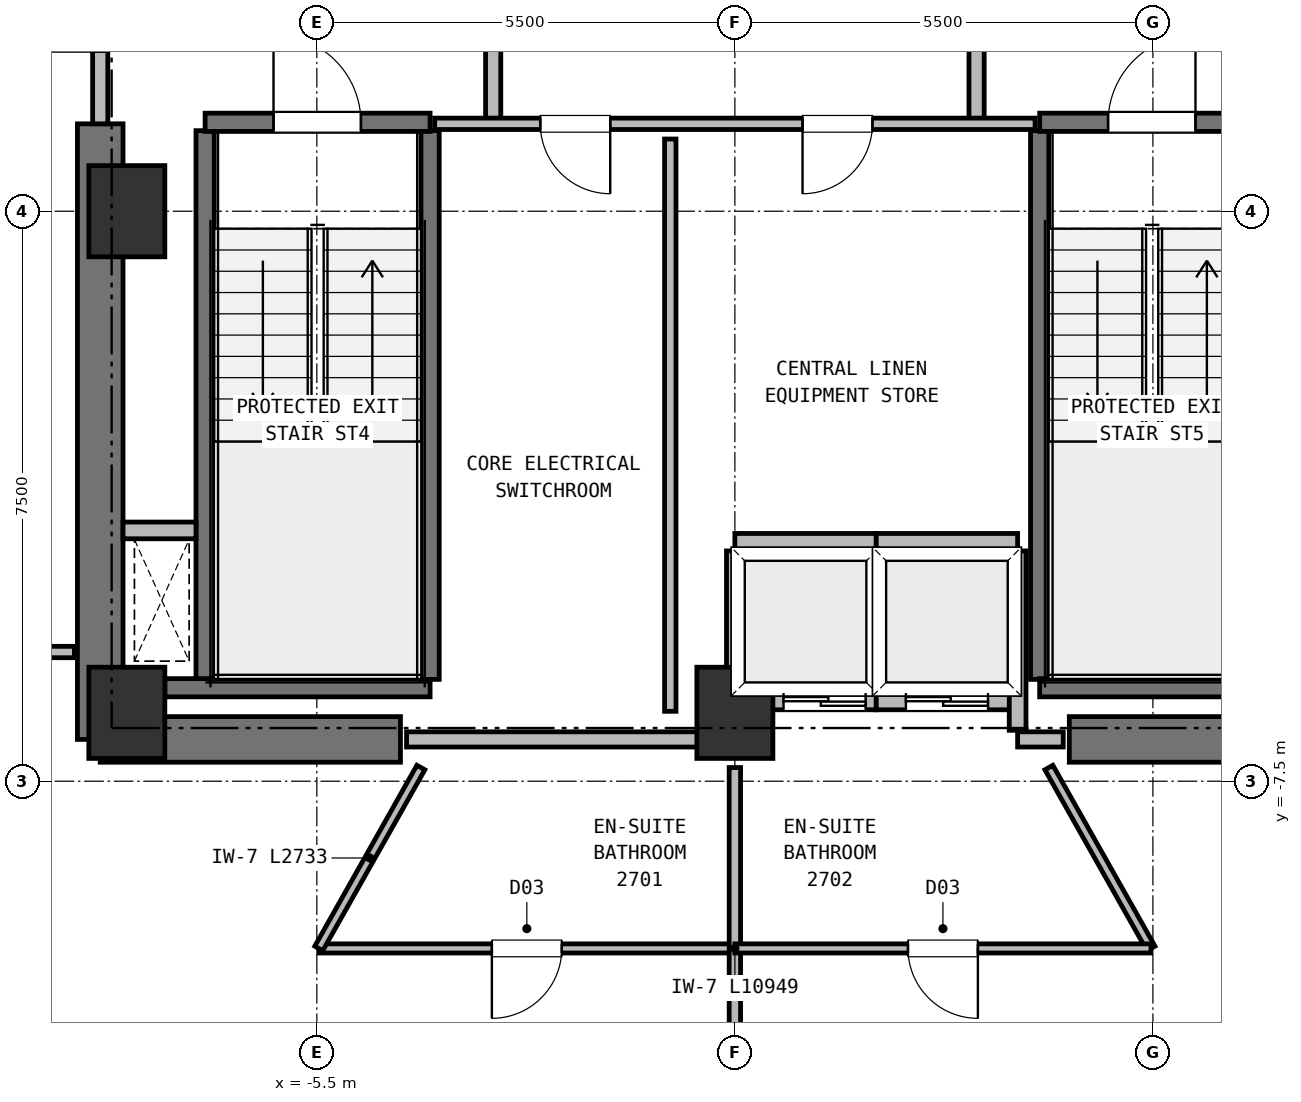
"""IFC4 building model, lengths in metres.
Left out: names, types, materials, properties, quantities, classifications, styles, units other than length and angle.
Written with IfcOpenShell. Run it as: python <this file> out.ifc"""

import sys

from ifc_helpers import new_model, si_unit, direction, frame, frame_2d, origin, origin_2d, place, context, subcontext, project, spatial, rectangle, extrude, element, fill, save


model = new_model("IFC4")
c1 = context("Model", 3, precision=1e-05, world=origin(), true_north=direction((0.0, 1.0)))
c2 = subcontext(c1, "Body", "Model", "MODEL_VIEW")
j1 = project(units=[si_unit("LENGTHUNIT", "METRE"), si_unit("PLANEANGLEUNIT", "RADIAN")], contexts=[c1])
p1 = place(None, origin())
s1 = spatial("IfcSite", under=j1, at=p1, CompositionType="ELEMENT")
p2 = place(p1, origin())
s2 = spatial("IfcBuilding", under=s1, at=p2, CompositionType="ELEMENT")
p3 = place(p2, frame((0.0, 0.0, 101.0)))
s3 = spatial("IfcBuildingStorey", under=s2, at=p3, CompositionType="ELEMENT", Elevation=101.0)
for number, where, z_axis, x_axis in (
    (1, (-8.0, -6.6, 0.0), (0.0, 0.0, 1.0), (1.0, 0.0, 0.0)),
    (2, (0.0, -6.6, 0.0), (0.0, 0.0, 1.0), (1.0, 0.0, 0.0)),
    (3, (-8.0, 0.0, 0.0), (0.0, 0.0, 1.0), (1.0, 0.0, 0.0)),
):
    element("IfcColumn", number, at=place(p3, frame(where, z_axis=z_axis, x_axis=x_axis)), inside=s3, PredefinedType="COLUMN", context=c2, shape_type="SweptSolid", body=[
        extrude(rectangle(XDim=1.0, YDim=1.2, at=origin_2d()), origin(), (0.0, 0.0, 1.0), 3.75),
    ])
for number, where, z_axis, x_axis in (
    (4, (-8.35, -6.95, 0.0), (0.0, 0.0, 1.0), (1.0, 0.0, 0.0)),
    (5, (4.4, -6.95, 0.0), (0.0, 0.0, 1.0), (1.0, 0.0, 0.0)),
):
    element("IfcWall", number, at=place(p3, frame(where, z_axis=z_axis, x_axis=x_axis)), inside=s3, PredefinedType="SHEAR", context=c2, shape_type="SweptSolid", body=[
        extrude(rectangle(XDim=3.95, YDim=0.6, at=frame_2d((1.975, 0.0))), origin(), (0.0, 0.0, 1.0), 3.5),
    ])
p4 = place(p3, frame((-8.35, -6.95, 0.0), z_axis=(0.0, 0.0, 1.0), x_axis=(0.0, 1.0, 0.0)))
e6 = element("IfcWall", 6, at=p4, inside=s3, PredefinedType="SHEAR", context=c2, shape_type="SweptSolid", body=[
    extrude(rectangle(XDim=8.1, YDim=0.6, at=frame_2d((4.05, 0.0))), origin(), (0.0, 0.0, 1.0), 3.5),
])
p5 = place(p3, frame((-6.97, -6.16, 0.0), z_axis=(0.0, 0.0, 1.0), x_axis=(0.0, 1.0, 0.0)))
e7 = element("IfcWall", 7, at=p5, inside=s3, PredefinedType="SHEAR", context=c2, shape_type="SweptSolid", body=[
    extrude(rectangle(XDim=7.22, YDim=0.24, at=frame_2d((3.61, 0.0))), origin(), (0.0, 0.0, 1.0), 3.5),
])
p6 = place(p3, frame((-7.5, -6.27, 0.0), z_axis=(0.0, 0.0, 1.0), x_axis=(1.0, 0.0, 0.0)))
e8 = element("IfcWall", 8, at=p6, inside=s3, PredefinedType="SHEAR", context=c2, shape_type="SweptSolid", body=[
    extrude(rectangle(XDim=3.49, YDim=0.24, at=frame_2d((1.745, 0.0))), origin(), (0.0, 0.0, 1.0), 3.5),
])
p7 = place(p3, frame((-4.01, -6.16, 0.0), z_axis=(0.0, 0.0, 1.0), x_axis=(0.0, 1.0, 0.0)))
e9 = element("IfcWall", 9, at=p7, inside=s3, PredefinedType="SHEAR", context=c2, shape_type="SweptSolid", body=[
    extrude(rectangle(XDim=7.22, YDim=0.24, at=frame_2d((3.61, 0.0))), origin(), (0.0, 0.0, 1.0), 3.5),
])
p8 = place(p3, frame((-6.97, 1.17, 0.0), z_axis=(0.0, 0.0, 1.0), x_axis=(1.0, 0.0, 0.0)))
e10 = element("IfcWall", 10, at=p8, inside=s3, PredefinedType="SHEAR", context=c2, shape_type="SweptSolid", body=[
    extrude(rectangle(XDim=2.96, YDim=0.24, at=frame_2d((1.48, 0.0))), origin(), (0.0, 0.0, 1.0), 3.5),
])
p9 = place(p8, frame((0.9, 0.0, 0.0)))
e11 = element("IfcOpeningElement", 11, at=p9, cuts=e10, PredefinedType="OPENING", context=c2, shape_type="SweptSolid", body=[
    extrude(rectangle(XDim=1.15, YDim=2.15, at=frame_2d((0.575, 1.075))), frame((0.0, 0.13, 0.0), z_axis=(0.0, -1.0, 0.0), x_axis=(1.0, 0.0, 0.0)), (0.0, 0.0, 1.0), 0.26),
])
p10 = place(p3, frame((4.01, -6.16, 0.0), z_axis=(0.0, 0.0, 1.0), x_axis=(0.0, 1.0, 0.0)))
e12 = element("IfcWall", 12, at=p10, inside=s3, PredefinedType="SHEAR", context=c2, shape_type="SweptSolid", body=[
    extrude(rectangle(XDim=7.22, YDim=0.24, at=frame_2d((3.61, 0.0))), origin(), (0.0, 0.0, 1.0), 3.5),
])
p11 = place(p3, frame((4.01, -6.27, 0.0), z_axis=(0.0, 0.0, 1.0), x_axis=(1.0, 0.0, 0.0)))
e13 = element("IfcWall", 13, at=p11, inside=s3, PredefinedType="SHEAR", context=c2, shape_type="SweptSolid", body=[
    extrude(rectangle(XDim=3.49, YDim=0.24, at=frame_2d((1.745, 0.0))), origin(), (0.0, 0.0, 1.0), 3.5),
])
p12 = place(p3, frame((4.01, 1.17, 0.0), z_axis=(0.0, 0.0, 1.0), x_axis=(1.0, 0.0, 0.0)))
e14 = element("IfcWall", 14, at=p12, inside=s3, PredefinedType="SHEAR", context=c2, shape_type="SweptSolid", body=[
    extrude(rectangle(XDim=2.96, YDim=0.24, at=frame_2d((1.48, 0.0))), origin(), (0.0, 0.0, 1.0), 3.5),
])
p13 = place(p12, frame((0.9, 0.0, 0.0)))
e15 = element("IfcOpeningElement", 15, at=p13, cuts=e14, PredefinedType="OPENING", context=c2, shape_type="SweptSolid", body=[
    extrude(rectangle(XDim=1.15, YDim=2.15, at=frame_2d((0.575, 1.075))), frame((0.0, 0.13, 0.0), z_axis=(0.0, -1.0, 0.0), x_axis=(1.0, 0.0, 0.0)), (0.0, 0.0, 1.0), 0.26),
])
p14 = place(p3, frame((-8.05, -4.2, 0.0), z_axis=(0.0, 0.0, 1.0), x_axis=(1.0, 0.0, 0.0)))
e16 = element("IfcWall", 16, at=p14, inside=s3, PredefinedType="PARTITIONING", context=c2, shape_type="SweptSolid", body=[
    extrude(rectangle(XDim=0.96, YDim=0.22, at=frame_2d((0.48, 0.0))), origin(), (0.0, 0.0, 1.0), 3.5),
])
p15 = place(p3, frame((0.0, -6.45, 0.0), z_axis=(0.0, 0.0, 1.0), x_axis=(1.0, 0.0, 0.0)))
e17 = element("IfcWall", 17, at=p15, inside=s3, PredefinedType="PARTITIONING", context=c2, shape_type="SweptSolid", body=[
    extrude(rectangle(XDim=1.86, YDim=0.22, at=frame_2d((0.93, 0.0))), origin(), (0.0, 0.0, 1.0), 3.12),
])
p16 = place(p15, frame((0.64, 0.0, 0.0)))
e18 = element("IfcOpeningElement", 18, at=p16, cuts=e17, PredefinedType="OPENING", context=c2, shape_type="SweptSolid", body=[
    extrude(rectangle(XDim=1.08, YDim=2.15, at=frame_2d((0.54, 1.075))), frame((0.0, 0.12, 0.0), z_axis=(0.0, -1.0, 0.0), x_axis=(1.0, 0.0, 0.0)), (0.0, 0.0, 1.0), 0.24),
])
for number, where, z_axis, x_axis in (
    (19, (0.0, -4.35, 0.0), (0.0, 0.0, 1.0), (1.0, 0.0, 0.0)),
    (20, (0.0, -6.33, 0.0), (0.0, 0.0, 1.0), (0.0, 1.0, 0.0)),
    (21, (1.86, -6.33, 0.0), (0.0, 0.0, 1.0), (0.0, 1.0, 0.0)),
):
    element("IfcWall", number, at=place(p3, frame(where, z_axis=z_axis, x_axis=x_axis)), inside=s3, PredefinedType="PARTITIONING", context=c2, shape_type="SweptSolid", body=[
        extrude(rectangle(XDim=1.86, YDim=0.22, at=frame_2d((0.93, 0.0))), origin(), (0.0, 0.0, 1.0), 3.5),
    ])
p17 = place(p3, frame((1.86, -6.45, 0.0), z_axis=(0.0, 0.0, 1.0), x_axis=(1.0, 0.0, 0.0)))
e22 = element("IfcWall", 22, at=p17, inside=s3, PredefinedType="PARTITIONING", context=c2, shape_type="SweptSolid", body=[
    extrude(rectangle(XDim=1.86, YDim=0.22, at=frame_2d((0.93, 0.0))), origin(), (0.0, 0.0, 1.0), 3.12),
])
p18 = place(p17, frame((0.39, 0.0, 0.0)))
e23 = element("IfcOpeningElement", 23, at=p18, cuts=e22, PredefinedType="OPENING", context=c2, shape_type="SweptSolid", body=[
    extrude(rectangle(XDim=1.08, YDim=2.15, at=frame_2d((0.54, 1.075))), frame((0.0, 0.12, 0.0), z_axis=(0.0, -1.0, 0.0), x_axis=(1.0, 0.0, 0.0)), (0.0, 0.0, 1.0), 0.24),
])
p19 = place(p3, frame((1.86, -4.35, 0.0), z_axis=(0.0, 0.0, 1.0), x_axis=(1.0, 0.0, 0.0)))
e24 = element("IfcWall", 24, at=p19, inside=s3, PredefinedType="PARTITIONING", context=c2, shape_type="SweptSolid", body=[
    extrude(rectangle(XDim=1.86, YDim=0.22, at=frame_2d((0.93, 0.0))), origin(), (0.0, 0.0, 1.0), 3.5),
])
p20 = place(p3, frame((3.72, -6.83, 0.0), z_axis=(0.0, 0.0, 1.0), x_axis=(0.0, 1.0, 0.0)))
e25 = element("IfcWall", 25, at=p20, inside=s3, PredefinedType="PARTITIONING", context=c2, shape_type="SweptSolid", body=[
    extrude(rectangle(XDim=2.36, YDim=0.22, at=frame_2d((1.18, 0.0))), origin(), (0.0, 0.0, 1.0), 3.5),
])
p21 = place(p3, frame((-3.18, 1.15, 0.0), z_axis=(0.0, 0.0, 1.0), x_axis=(0.0, 1.0, 0.0)))
e26 = element("IfcWall", 26, at=p21, inside=s3, PredefinedType="PARTITIONING", context=c2, shape_type="SweptSolid", body=[
    extrude(rectangle(XDim=3.3, YDim=0.2, at=frame_2d((1.65, 0.0))), origin(), (0.0, 0.0, 1.0), 3.5),
])
p22 = place(p21, frame((1.08, 0.0, 0.0)))
e27 = element("IfcOpeningElement", 27, at=p22, cuts=e26, PredefinedType="OPENING", context=c2, shape_type="SweptSolid", body=[
    extrude(rectangle(XDim=1.15, YDim=2.15, at=frame_2d((0.575, 1.075))), frame((0.0, 0.11, 0.0), z_axis=(0.0, -1.0, 0.0), x_axis=(1.0, 0.0, 0.0)), (0.0, 0.0, 1.0), 0.22),
])
p23 = place(p3, frame((3.18, 1.15, 0.0), z_axis=(0.0, 0.0, 1.0), x_axis=(0.0, 1.0, 0.0)))
e28 = element("IfcWall", 28, at=p23, inside=s3, PredefinedType="PARTITIONING", context=c2, shape_type="SweptSolid", body=[
    extrude(rectangle(XDim=3.3, YDim=0.2, at=frame_2d((1.65, 0.0))), origin(), (0.0, 0.0, 1.0), 3.5),
])
p24 = place(p23, frame((1.08, 0.0, 0.0)))
e29 = element("IfcOpeningElement", 29, at=p24, cuts=e28, PredefinedType="OPENING", context=c2, shape_type="SweptSolid", body=[
    extrude(rectangle(XDim=1.15, YDim=2.15, at=frame_2d((0.575, 1.075))), frame((0.0, 0.11, 0.0), z_axis=(0.0, -1.0, 0.0), x_axis=(1.0, 0.0, 0.0)), (0.0, 0.0, 1.0), 0.22),
])
p25 = place(p3, frame((-8.35, 1.15, 0.0), z_axis=(0.0, 0.0, 1.0), x_axis=(0.0, 1.0, 0.0)))
e30 = element("IfcWall", 30, at=p25, inside=s3, PredefinedType="PARTITIONING", context=c2, shape_type="SweptSolid", body=[
    extrude(rectangle(XDim=5.4, YDim=0.2, at=frame_2d((2.7, 0.0))), origin(), (0.0, 0.0, 1.0), 3.5),
])
p26 = place(p25, frame((0.95, 0.0, 0.0)))
e31 = element("IfcOpeningElement", 31, at=p26, cuts=e30, PredefinedType="OPENING", context=c2, shape_type="SweptSolid", body=[
    extrude(rectangle(XDim=1.15, YDim=2.15, at=frame_2d((0.575, 1.075))), frame((0.0, 0.11, 0.0), z_axis=(0.0, -1.0, 0.0), x_axis=(1.0, 0.0, 0.0)), (0.0, 0.0, 1.0), 0.22),
])
p27 = place(p3, frame((3.95, 1.15, 0.0), z_axis=(0.0, 0.0, 1.0), x_axis=(-1.0, 0.0, 0.0)))
e32 = element("IfcWall", 32, at=p27, inside=s3, PredefinedType="PARTITIONING", context=c2, shape_type="SweptSolid", body=[
    extrude(rectangle(XDim=7.9, YDim=0.15, at=frame_2d((3.95, 0.0))), origin(), (0.0, 0.0, 1.0), 3.5),
])
p28 = place(p27, frame((5.59, 0.0, 0.0)))
e33 = element("IfcOpeningElement", 33, at=p28, cuts=e32, PredefinedType="OPENING", context=c2, shape_type="SweptSolid", body=[
    extrude(rectangle(XDim=0.92, YDim=2.05, at=frame_2d((0.46, 1.025))), frame((0.0, 0.085, 0.0), z_axis=(0.0, -1.0, 0.0), x_axis=(1.0, 0.0, 0.0)), (0.0, 0.0, 1.0), 0.17),
])
p29 = place(p27, frame((2.14, 0.0, 0.0)))
e34 = element("IfcOpeningElement", 34, at=p29, cuts=e32, PredefinedType="OPENING", context=c2, shape_type="SweptSolid", body=[
    extrude(rectangle(XDim=0.92, YDim=2.05, at=frame_2d((0.46, 1.025))), frame((0.0, 0.085, 0.0), z_axis=(0.0, -1.0, 0.0), x_axis=(1.0, 0.0, 0.0)), (0.0, 0.0, 1.0), 0.17),
])
p30 = place(p3, frame((-4.32, -6.95, 0.0), z_axis=(0.0, 0.0, 1.0), x_axis=(1.0, 0.0, 0.0)))
e35 = element("IfcWall", 35, at=p30, inside=s3, PredefinedType="PARTITIONING", context=c2, shape_type="SweptSolid", body=[
    extrude(rectangle(XDim=4.32, YDim=0.2, at=frame_2d((2.16, 0.0))), origin(), (0.0, 0.0, 1.0), 3.5),
])
p31 = place(p3, frame((3.72, -6.95, 0.0), z_axis=(0.0, 0.0, 1.0), x_axis=(1.0, 0.0, 0.0)))
e36 = element("IfcWall", 36, at=p31, inside=s3, PredefinedType="PARTITIONING", context=c2, shape_type="SweptSolid", body=[
    extrude(rectangle(XDim=0.6, YDim=0.2, at=frame_2d((0.3, 0.0))), origin(), (0.0, 0.0, 1.0), 3.5),
])
p32 = place(p3, frame((-0.85, -6.58, 0.0), z_axis=(0.0, 0.0, 1.0), x_axis=(0.0, 1.0, 0.0)))
e37 = element("IfcWall", 37, at=p32, inside=s3, PredefinedType="PARTITIONING", context=c2, shape_type="SweptSolid", body=[
    extrude(rectangle(XDim=7.53, YDim=0.15, at=frame_2d((3.765, 0.0))), origin(), (0.0, 0.0, 1.0), 3.5),
])
p33 = place(p3, frame((-8.69, -5.8, 0.0), z_axis=(0.0, 0.0, 1.0), x_axis=(-1.0, 0.0, 0.0)))
e38 = element("IfcWall", 38, at=p33, inside=s3, PredefinedType="PARTITIONING", context=c2, shape_type="SweptSolid", body=[
    extrude(rectangle(XDim=2.02, YDim=0.15, at=frame_2d((1.01, 0.0))), origin(), (0.0, 0.0, 1.0), 3.5),
])
p34 = place(p33, frame((0.52, 0.0, 0.0)))
e39 = element("IfcOpeningElement", 39, at=p34, cuts=e38, PredefinedType="OPENING", context=c2, shape_type="SweptSolid", body=[
    extrude(rectangle(XDim=1.06, YDim=2.15, at=frame_2d((0.53, 1.075))), frame((0.0, 0.085, 0.0), z_axis=(0.0, -1.0, 0.0), x_axis=(1.0, 0.0, 0.0)), (0.0, 0.0, 1.0), 0.17),
])
p35 = place(p3, frame((0.0, -9.7, 0.0), z_axis=(0.0, 0.0, 1.0), x_axis=(-1.0, 0.0, 0.0)))
e40 = element("IfcWall", 40, at=p35, inside=s3, PredefinedType="PARTITIONING", context=c2, shape_type="SweptSolid", body=[
    extrude(rectangle(XDim=5.475, YDim=0.12, at=frame_2d((2.737, 0.0))), origin(), (0.0, 0.0, 1.0), 3.5),
])
p36 = place(p35, frame((2.277, 0.0, 0.0)))
e41 = element("IfcOpeningElement", 41, at=p36, cuts=e40, PredefinedType="OPENING", context=c2, shape_type="SweptSolid", body=[
    extrude(rectangle(XDim=0.92, YDim=2.1, at=frame_2d((0.46, 1.05))), frame((0.0, 0.07, 0.0), z_axis=(0.0, -1.0, 0.0), x_axis=(1.0, 0.0, 0.0)), (0.0, 0.0, 1.0), 0.14),
])
p37 = place(p3, frame((-5.475, -9.7, 0.0), z_axis=(0.0, 0.0, 1.0), x_axis=(0.491533175525, 0.870858850422, 0.0)))
e42 = element("IfcWall", 42, at=p37, inside=s3, PredefinedType="PARTITIONING", context=c2, shape_type="SweptSolid", body=[
    extrude(rectangle(XDim=2.733, YDim=0.12, at=frame_2d((1.366, 0.0))), origin(), (0.0, 0.0, 1.0), 3.5),
])
p38 = place(p3, frame((0.0, -7.32, 0.0), z_axis=(0.0, 0.0, 1.0), x_axis=(0.0, -1.0, 0.0)))
e43 = element("IfcWall", 43, at=p38, inside=s3, PredefinedType="PARTITIONING", context=c2, shape_type="SweptSolid", body=[
    extrude(rectangle(XDim=10.627, YDim=0.15, at=frame_2d((5.314, 0.0))), origin(), (0.0, 0.0, 1.0), 3.5),
])
p39 = place(p3, frame((4.131, -7.32, 0.0), z_axis=(0.0, 0.0, 1.0), x_axis=(0.491533175525, -0.870858850422, 0.0)))
e44 = element("IfcWall", 44, at=p39, inside=s3, PredefinedType="PARTITIONING", context=c2, shape_type="SweptSolid", body=[
    extrude(rectangle(XDim=2.733, YDim=0.12, at=frame_2d((1.366, 0.0))), origin(), (0.0, 0.0, 1.0), 3.5),
])
p40 = place(p3, frame((5.475, -9.7, 0.0), z_axis=(0.0, 0.0, 1.0), x_axis=(-1.0, 0.0, 0.0)))
e45 = element("IfcWall", 45, at=p40, inside=s3, PredefinedType="PARTITIONING", context=c2, shape_type="SweptSolid", body=[
    extrude(rectangle(XDim=5.475, YDim=0.12, at=frame_2d((2.737, 0.0))), origin(), (0.0, 0.0, 1.0), 3.5),
])
p41 = place(p40, frame((2.277, 0.0, 0.0)))
e46 = element("IfcOpeningElement", 46, at=p41, cuts=e45, PredefinedType="OPENING", context=c2, shape_type="SweptSolid", body=[
    extrude(rectangle(XDim=0.92, YDim=2.1, at=frame_2d((0.46, 1.05))), frame((0.0, 0.07, 0.0), z_axis=(0.0, -1.0, 0.0), x_axis=(1.0, 0.0, 0.0)), (0.0, 0.0, 1.0), 0.14),
])
p42 = place(p9, origin())
e47 = element("IfcDoor", 47, at=p42, inside=s3, OperationType="SINGLE_SWING_LEFT", PredefinedType="DOOR", context=c2, shape_type="SweptSolid", body=[
    extrude(rectangle(XDim=1.15, YDim=2.15, at=frame_2d((0.575, 1.075))), frame((0.0, 0.025, 0.0), z_axis=(0.0, -1.0, 0.0), x_axis=(1.0, 0.0, 0.0)), (0.0, 0.0, 1.0), 0.05),
])
fill(e11, e47)
p43 = place(p13, origin())
e48 = element("IfcDoor", 48, at=p43, inside=s3, OperationType="SINGLE_SWING_RIGHT", PredefinedType="DOOR", context=c2, shape_type="SweptSolid", body=[
    extrude(rectangle(XDim=1.15, YDim=2.15, at=frame_2d((0.575, 1.075))), frame((0.0, 0.025, 0.0), z_axis=(0.0, -1.0, 0.0), x_axis=(1.0, 0.0, 0.0)), (0.0, 0.0, 1.0), 0.05),
])
fill(e15, e48)
p44 = place(p16, origin())
e49 = element("IfcDoor", 49, at=p44, inside=s3, OperationType="DOUBLE_DOOR_SLIDING", PredefinedType="DOOR", context=c2, shape_type="SweptSolid", body=[
    extrude(rectangle(XDim=1.08, YDim=2.15, at=frame_2d((0.54, 1.075))), frame((0.0, 0.025, 0.0), z_axis=(0.0, -1.0, 0.0), x_axis=(1.0, 0.0, 0.0)), (0.0, 0.0, 1.0), 0.05),
])
fill(e18, e49)
p45 = place(p18, origin())
e50 = element("IfcDoor", 50, at=p45, inside=s3, OperationType="DOUBLE_DOOR_SLIDING", PredefinedType="DOOR", context=c2, shape_type="SweptSolid", body=[
    extrude(rectangle(XDim=1.08, YDim=2.15, at=frame_2d((0.54, 1.075))), frame((0.0, 0.025, 0.0), z_axis=(0.0, -1.0, 0.0), x_axis=(1.0, 0.0, 0.0)), (0.0, 0.0, 1.0), 0.05),
])
fill(e23, e50)
p46 = place(p26, origin())
e51 = element("IfcDoor", 51, at=p46, inside=s3, OperationType="SINGLE_SWING_LEFT", PredefinedType="DOOR", context=c2, shape_type="SweptSolid", body=[
    extrude(rectangle(XDim=1.15, YDim=2.15, at=frame_2d((0.575, 1.075))), frame((0.0, 0.025, 0.0), z_axis=(0.0, -1.0, 0.0), x_axis=(1.0, 0.0, 0.0)), (0.0, 0.0, 1.0), 0.05),
])
fill(e31, e51)
p47 = place(p28, origin())
e52 = element("IfcDoor", 52, at=p47, inside=s3, OperationType="SINGLE_SWING_LEFT", PredefinedType="DOOR", context=c2, shape_type="SweptSolid", body=[
    extrude(rectangle(XDim=0.92, YDim=2.05, at=frame_2d((0.46, 1.025))), frame((0.0, 0.025, 0.0), z_axis=(0.0, -1.0, 0.0), x_axis=(1.0, 0.0, 0.0)), (0.0, 0.0, 1.0), 0.05),
])
fill(e33, e52)
p48 = place(p29, origin())
e53 = element("IfcDoor", 53, at=p48, inside=s3, OperationType="SINGLE_SWING_RIGHT", PredefinedType="DOOR", context=c2, shape_type="SweptSolid", body=[
    extrude(rectangle(XDim=0.92, YDim=2.05, at=frame_2d((0.46, 1.025))), frame((0.0, 0.025, 0.0), z_axis=(0.0, -1.0, 0.0), x_axis=(1.0, 0.0, 0.0)), (0.0, 0.0, 1.0), 0.05),
])
fill(e34, e53)
p49 = place(p36, origin())
e54 = element("IfcDoor", 54, at=p49, inside=s3, OperationType="SINGLE_SWING_RIGHT", PredefinedType="DOOR", context=c2, shape_type="SweptSolid", body=[
    extrude(rectangle(XDim=0.92, YDim=2.1, at=frame_2d((0.46, 1.05))), frame((0.0, 0.025, 0.0), z_axis=(0.0, -1.0, 0.0), x_axis=(1.0, 0.0, 0.0)), (0.0, 0.0, 1.0), 0.05),
])
fill(e41, e54)
p50 = place(p41, origin())
e55 = element("IfcDoor", 55, at=p50, inside=s3, OperationType="SINGLE_SWING_LEFT", PredefinedType="DOOR", context=c2, shape_type="SweptSolid", body=[
    extrude(rectangle(XDim=0.92, YDim=2.1, at=frame_2d((0.46, 1.05))), frame((0.0, 0.025, 0.0), z_axis=(0.0, -1.0, 0.0), x_axis=(1.0, 0.0, 0.0)), (0.0, 0.0, 1.0), 0.05),
])
fill(e46, e55)
save(model, sys.argv[1])
